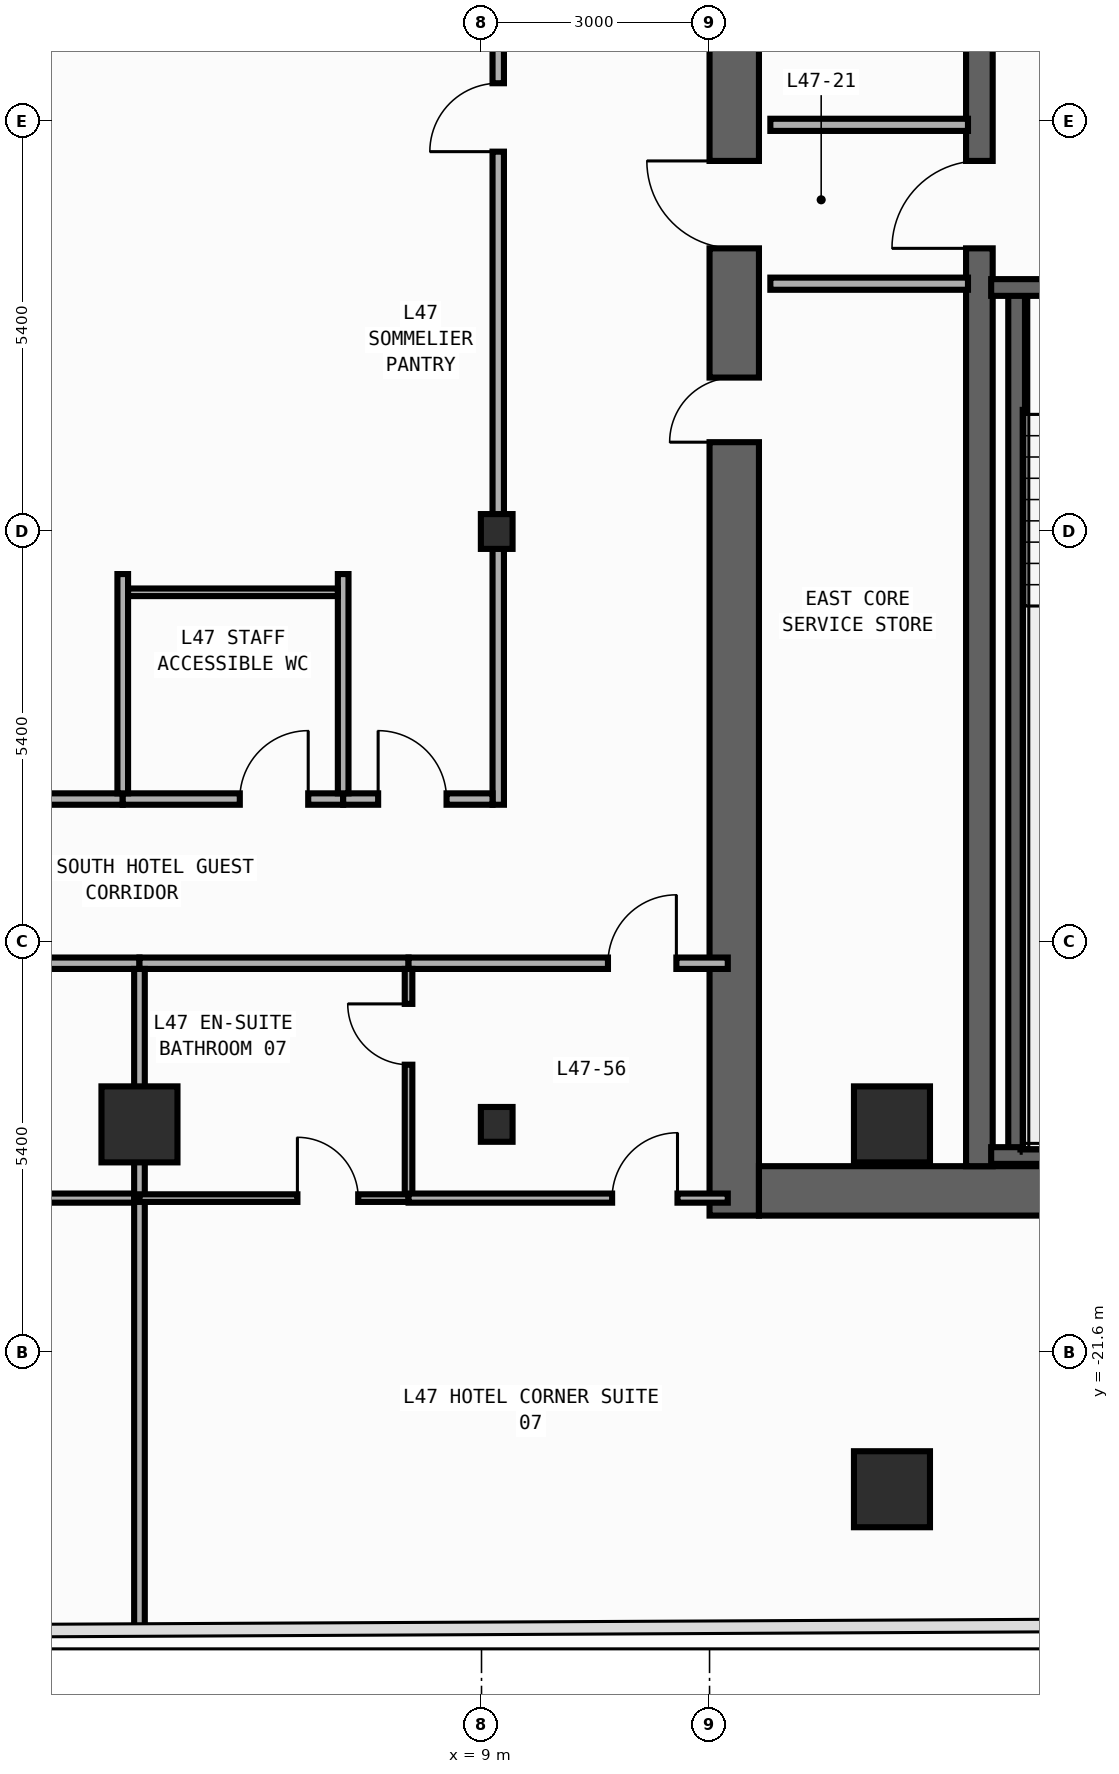
"""IFC4 building model, lengths in metres.
Left out: names, types, materials, properties, quantities, classifications, styles, units other than length and angle.
Written with IfcOpenShell. Run it as: python <this file> out.ifc"""

import sys

from ifc_helpers import new_model, si_unit, direction, frame, frame_2d, origin, origin_2d, place, context, subcontext, project, spatial, rectangle, i_section, extrude, element, fill, save


model = new_model("IFC4")
c1 = context("Model", 3, precision=1e-05, world=origin(), true_north=direction((0.0, 1.0)))
c2 = subcontext(c1, "Body", "Model", "MODEL_VIEW")
j1 = project(units=[si_unit("LENGTHUNIT", "METRE"), si_unit("PLANEANGLEUNIT", "RADIAN")], contexts=[c1])
p1 = place(None, origin())
s1 = spatial("IfcSite", under=j1, at=p1, CompositionType="ELEMENT")
p2 = place(p1, origin())
s2 = spatial("IfcBuilding", under=s1, at=p2, CompositionType="ELEMENT")
p3 = place(p2, frame((0.0, 0.0, 203.0)))
s3 = spatial("IfcBuildingStorey", under=s2, at=p3, CompositionType="ELEMENT", Elevation=203.0)
p4 = place(p3, frame((12.325, -19.8, 0.0), z_axis=(0.0, 0.0, 1.0), x_axis=(0.0, 1.0, 0.0)))
e1 = element("IfcWall", 1, at=p4, inside=s3, PredefinedType="SHEAR", context=c2, shape_type="SweptSolid", body=[
    extrude(rectangle(XDim=27.0, YDim=0.65, at=frame_2d((13.5, 0.0))), origin(), (0.0, 0.0, 1.0), 3.54),
])
p5 = place(p4, frame((23.05, 0.0, 0.0)))
e2 = element("IfcOpeningElement", 2, at=p5, cuts=e1, PredefinedType="OPENING", context=c2, shape_type="SweptSolid", body=[
    extrude(rectangle(XDim=1.1, YDim=2.2, at=frame_2d((0.55, 1.1))), frame((0.0, 0.335, 0.0), z_axis=(0.0, -1.0, 0.0), x_axis=(1.0, 0.0, 0.0)), (0.0, 0.0, 1.0), 0.67),
])
p6 = place(p4, frame((19.85, 0.0, 0.0)))
e3 = element("IfcOpeningElement", 3, at=p6, cuts=e1, PredefinedType="OPENING", context=c2, shape_type="SweptSolid", body=[
    extrude(rectangle(XDim=1.1, YDim=2.2, at=frame_2d((0.55, 1.1))), frame((0.0, 0.335, 0.0), z_axis=(0.0, -1.0, 0.0), x_axis=(1.0, 0.0, 0.0)), (0.0, 0.0, 1.0), 0.67),
])
p7 = place(p4, frame((16.65, 0.0, 0.0)))
e4 = element("IfcOpeningElement", 4, at=p7, cuts=e1, PredefinedType="OPENING", context=c2, shape_type="SweptSolid", body=[
    extrude(rectangle(XDim=1.1, YDim=2.2, at=frame_2d((0.55, 1.1))), frame((0.0, 0.335, 0.0), z_axis=(0.0, -1.0, 0.0), x_axis=(1.0, 0.0, 0.0)), (0.0, 0.0, 1.0), 0.67),
])
p8 = place(p4, frame((10.175, 0.0, 0.0)))
e5 = element("IfcOpeningElement", 5, at=p8, cuts=e1, PredefinedType="OPENING", context=c2, shape_type="SweptSolid", body=[
    extrude(rectangle(XDim=0.85, YDim=2.1, at=frame_2d((0.425, 1.05))), frame((0.0, 0.335, 0.0), z_axis=(0.0, -1.0, 0.0), x_axis=(1.0, 0.0, 0.0)), (0.0, 0.0, 1.0), 0.67),
])
p9 = place(p4, frame((12.725, 0.0, 0.0)))
e6 = element("IfcOpeningElement", 6, at=p9, cuts=e1, PredefinedType="OPENING", context=c2, shape_type="SweptSolid", body=[
    extrude(rectangle(XDim=1.15, YDim=2.2, at=frame_2d((0.575, 1.1))), frame((0.0, 0.335, 0.0), z_axis=(0.0, -1.0, 0.0), x_axis=(1.0, 0.0, 0.0)), (0.0, 0.0, 1.0), 0.67),
])
p10 = place(p4, frame((25.125, 0.0, 0.0)))
e7 = element("IfcOpeningElement", 7, at=p10, cuts=e1, PredefinedType="OPENING", context=c2, shape_type="SweptSolid", body=[
    extrude(rectangle(XDim=0.85, YDim=2.1, at=frame_2d((0.425, 1.05))), frame((0.0, 0.335, 0.0), z_axis=(0.0, -1.0, 0.0), x_axis=(1.0, 0.0, 0.0)), (0.0, 0.0, 1.0), 0.67),
])
p11 = place(p3, frame((12.65, -19.475, 0.0), z_axis=(0.0, 0.0, 1.0), x_axis=(1.0, 0.0, 0.0)))
e8 = element("IfcWall", 8, at=p11, inside=s3, PredefinedType="SHEAR", context=c2, shape_type="SweptSolid", body=[
    extrude(rectangle(XDim=7.1, YDim=0.65, at=frame_2d((3.55, 0.0))), origin(), (0.0, 0.0, 1.0), 3.54),
])
p12 = place(p3, frame((15.55, -19.15, 0.0), z_axis=(0.0, 0.0, 1.0), x_axis=(0.0, 1.0, 0.0)))
e9 = element("IfcWall", 9, at=p12, inside=s3, PredefinedType="SHEAR", context=c2, shape_type="SweptSolid", body=[
    extrude(rectangle(XDim=25.7, YDim=0.35, at=frame_2d((12.85, 0.0))), origin(), (0.0, 0.0, 1.0), 3.54),
])
p13 = place(p12, frame((12.075, 0.0, 0.0)))
e10 = element("IfcOpeningElement", 10, at=p13, cuts=e9, PredefinedType="OPENING", context=c2, shape_type="SweptSolid", body=[
    extrude(rectangle(XDim=1.15, YDim=2.2, at=frame_2d((0.575, 1.1))), frame((0.0, 0.185, 0.0), z_axis=(0.0, -1.0, 0.0), x_axis=(1.0, 0.0, 0.0)), (0.0, 0.0, 1.0), 0.37),
])
p14 = place(p12, frame((24.475, 0.0, 0.0)))
e11 = element("IfcOpeningElement", 11, at=p14, cuts=e9, PredefinedType="OPENING", context=c2, shape_type="SweptSolid", body=[
    extrude(rectangle(XDim=0.85, YDim=2.1, at=frame_2d((0.425, 1.05))), frame((0.0, 0.185, 0.0), z_axis=(0.0, -1.0, 0.0), x_axis=(1.0, 0.0, 0.0)), (0.0, 0.0, 1.0), 0.37),
])
p15 = place(p3, frame((16.04, -19.01, 0.0), z_axis=(0.0, 0.0, 1.0), x_axis=(0.0, 1.0, 0.0)))
e12 = element("IfcWall", 12, at=p15, inside=s3, PredefinedType="SHEAR", context=c2, shape_type="SweptSolid", body=[
    extrude(rectangle(XDim=11.42, YDim=0.22, at=frame_2d((5.71, 0.0))), origin(), (0.0, 0.0, 1.0), 3.54),
])
p16 = place(p3, frame((15.705, -19.01, 0.0), z_axis=(0.0, 0.0, 1.0), x_axis=(1.0, 0.0, 0.0)))
e13 = element("IfcWall", 13, at=p16, inside=s3, PredefinedType="SHEAR", context=c2, shape_type="SweptSolid", body=[
    extrude(rectangle(XDim=4.065, YDim=0.22, at=frame_2d((2.032, 0.0))), origin(), (0.0, 0.0, 1.0), 3.54),
])
p17 = place(p3, frame((19.77, -7.59, 0.0), z_axis=(0.0, 0.0, 1.0), x_axis=(-1.0, 0.0, 0.0)))
e14 = element("IfcWall", 14, at=p17, inside=s3, PredefinedType="SHEAR", context=c2, shape_type="SweptSolid", body=[
    extrude(rectangle(XDim=4.065, YDim=0.22, at=frame_2d((2.032, 0.0))), origin(), (0.0, 0.0, 1.0), 3.54),
])
p18 = place(p17, frame((1.08, 0.0, 0.0)))
e15 = element("IfcOpeningElement", 15, at=p18, cuts=e14, PredefinedType="OPENING", context=c2, shape_type="SweptSolid", body=[
    extrude(rectangle(XDim=1.1, YDim=2.2, at=frame_2d((0.55, 1.1))), frame((0.0, 0.12, 0.0), z_axis=(0.0, -1.0, 0.0), x_axis=(1.0, 0.0, 0.0)), (0.0, 0.0, 1.0), 0.24),
])
for number, where, z_axis, x_axis in (
    (16, (9.2, -18.6, 0.0), (0.0, 0.0, 1.0), (1.0, 0.0, 0.0)),
    (17, (9.2, -10.8, 0.0), (0.0, 0.0, 1.0), (1.0, 0.0, 0.0)),
):
    element("IfcColumn", number, at=place(p3, frame(where, z_axis=z_axis, x_axis=x_axis)), inside=s3, PredefinedType="COLUMN", context=c2, shape_type="SweptSolid", body=[
        extrude(i_section(OverallWidth=0.417, OverallDepth=0.458, WebThickness=0.03, FlangeThickness=0.05, FilletRadius=0.022, at=origin_2d()), origin(), (0.0, 0.0, 1.0), 3.8),
    ])
for number, where, z_axis, x_axis in (
    (18, (14.4, -18.6, 0.0), (0.0, 0.0, 1.0), (1.0, 0.0, 0.0)),
    (19, (4.5, -18.6, 0.0), (0.0, 0.0, 1.0), (1.0, 0.0, 0.0)),
    (20, (14.4, -23.4, 0.0), (0.0, 0.0, 1.0), (1.0, 0.0, 0.0)),
):
    element("IfcColumn", number, at=place(p3, frame(where, z_axis=z_axis, x_axis=x_axis)), inside=s3, PredefinedType="COLUMN", context=c2, shape_type="SweptSolid", body=[
        extrude(rectangle(XDim=1.0, YDim=1.0, at=origin_2d()), origin(), (0.0, 0.0, 1.0), 3.8),
    ])
for number, where, z_axis, x_axis in (
    (21, (12.8, -5.45, 0.0), (0.0, 0.0, 1.0), (1.0, 0.0, 0.0)),
    (22, (12.8, -7.54, 0.0), (0.0, 0.0, 1.0), (1.0, 0.0, 0.0)),
):
    element("IfcWall", number, at=place(p3, frame(where, z_axis=z_axis, x_axis=x_axis)), inside=s3, PredefinedType="STANDARD", context=c2, shape_type="SweptSolid", body=[
        extrude(rectangle(XDim=2.6, YDim=0.16, at=frame_2d((1.3, 0.0))), origin(), (0.0, 0.0, 1.0), 3.54),
    ])
p19 = place(p3, frame((9.22, -14.395, 0.0), z_axis=(0.0, 0.0, 1.0), x_axis=(0.0, 1.0, 0.0)))
e23 = element("IfcWall", 23, at=p19, inside=s3, PredefinedType="PARTITIONING", context=c2, shape_type="SweptSolid", body=[
    extrude(rectangle(XDim=12.595, YDim=0.15, at=frame_2d((6.297, 0.0))), origin(), (0.0, 0.0, 1.0), 2.952),
])
p20 = place(p19, frame((8.592, 0.0, 0.0)))
e24 = element("IfcOpeningElement", 24, at=p20, cuts=e23, PredefinedType="OPENING", context=c2, shape_type="SweptSolid", body=[
    extrude(rectangle(XDim=0.9, YDim=2.15, at=frame_2d((0.45, 1.075))), frame((0.0, 0.085, 0.0), z_axis=(0.0, -1.0, 0.0), x_axis=(1.0, 0.0, 0.0)), (0.0, 0.0, 1.0), 0.17),
])
p21 = place(p3, frame((-3.32, -14.32, 0.0), z_axis=(0.0, 0.0, 1.0), x_axis=(1.0, 0.0, 0.0)))
e25 = element("IfcWall", 25, at=p21, inside=s3, PredefinedType="PARTITIONING", context=c2, shape_type="SweptSolid", body=[
    extrude(rectangle(XDim=7.6, YDim=0.15, at=frame_2d((3.8, 0.0))), origin(), (0.0, 0.0, 1.0), 3.54),
])
p22 = place(p21, frame((0.667, 0.0, 0.0)))
e26 = element("IfcOpeningElement", 26, at=p22, cuts=e25, PredefinedType="OPENING", context=c2, shape_type="SweptSolid", body=[
    extrude(rectangle(XDim=0.9, YDim=2.15, at=frame_2d((0.45, 1.075))), frame((0.0, 0.085, 0.0), z_axis=(0.0, -1.0, 0.0), x_axis=(1.0, 0.0, 0.0)), (0.0, 0.0, 1.0), 0.17),
])
p23 = place(p3, frame((4.28, -14.32, 0.0), z_axis=(0.0, 0.0, 1.0), x_axis=(1.0, 0.0, 0.0)))
e27 = element("IfcWall", 27, at=p23, inside=s3, PredefinedType="PARTITIONING", context=c2, shape_type="SweptSolid", body=[
    extrude(rectangle(XDim=2.9, YDim=0.15, at=frame_2d((1.45, 0.0))), origin(), (0.0, 0.0, 1.0), 3.54),
])
p24 = place(p23, frame((1.54, 0.0, 0.0)))
e28 = element("IfcOpeningElement", 28, at=p24, cuts=e27, PredefinedType="OPENING", context=c2, shape_type="SweptSolid", body=[
    extrude(rectangle(XDim=0.9, YDim=2.15, at=frame_2d((0.45, 1.075))), frame((0.0, 0.085, 0.0), z_axis=(0.0, -1.0, 0.0), x_axis=(1.0, 0.0, 0.0)), (0.0, 0.0, 1.0), 0.17),
])
p25 = place(p3, frame((7.18, -14.32, 0.0), z_axis=(0.0, 0.0, 1.0), x_axis=(1.0, 0.0, 0.0)))
e29 = element("IfcWall", 29, at=p25, inside=s3, PredefinedType="PARTITIONING", context=c2, shape_type="SweptSolid", body=[
    extrude(rectangle(XDim=1.965, YDim=0.15, at=frame_2d((0.982, 0.0))), origin(), (0.0, 0.0, 1.0), 3.54),
])
p26 = place(p25, frame((0.46, 0.0, 0.0)))
e30 = element("IfcOpeningElement", 30, at=p26, cuts=e29, PredefinedType="OPENING", context=c2, shape_type="SweptSolid", body=[
    extrude(rectangle(XDim=0.9, YDim=2.15, at=frame_2d((0.45, 1.075))), frame((0.0, 0.085, 0.0), z_axis=(0.0, -1.0, 0.0), x_axis=(1.0, 0.0, 0.0)), (0.0, 0.0, 1.0), 0.17),
])
p27 = place(p3, frame((-5.46, -16.48, 0.0), z_axis=(0.0, 0.0, 1.0), x_axis=(1.0, 0.0, 0.0)))
e31 = element("IfcWall", 31, at=p27, inside=s3, PredefinedType="PARTITIONING", context=c2, shape_type="SweptSolid", body=[
    extrude(rectangle(XDim=9.96, YDim=0.15, at=frame_2d((4.98, 0.0))), origin(), (0.0, 0.0, 1.0), 3.54),
])
p28 = place(p27, frame((2.698, 0.0, 0.0)))
e32 = element("IfcOpeningElement", 32, at=p28, cuts=e31, PredefinedType="OPENING", context=c2, shape_type="SweptSolid", body=[
    extrude(rectangle(XDim=0.9, YDim=2.15, at=frame_2d((0.45, 1.075))), frame((0.0, 0.085, 0.0), z_axis=(0.0, -1.0, 0.0), x_axis=(1.0, 0.0, 0.0)), (0.0, 0.0, 1.0), 0.17),
])
p29 = place(p3, frame((4.5, -16.48, 0.0), z_axis=(0.0, 0.0, 1.0), x_axis=(1.0, 0.0, 0.0)))
e33 = element("IfcWall", 33, at=p29, inside=s3, PredefinedType="PARTITIONING", context=c2, shape_type="SweptSolid", body=[
    extrude(rectangle(XDim=3.54, YDim=0.15, at=frame_2d((1.77, 0.0))), origin(), (0.0, 0.0, 1.0), 3.54),
])
p30 = place(p3, frame((8.04, -16.48, 0.0), z_axis=(0.0, 0.0, 1.0), x_axis=(1.0, 0.0, 0.0)))
e34 = element("IfcWall", 34, at=p30, inside=s3, PredefinedType="PARTITIONING", context=c2, shape_type="SweptSolid", body=[
    extrude(rectangle(XDim=4.2, YDim=0.15, at=frame_2d((2.1, 0.0))), origin(), (0.0, 0.0, 1.0), 3.54),
])
p31 = place(p30, frame((2.624, 0.0, 0.0)))
e35 = element("IfcOpeningElement", 35, at=p31, cuts=e34, PredefinedType="OPENING", context=c2, shape_type="SweptSolid", body=[
    extrude(rectangle(XDim=0.9, YDim=2.15, at=frame_2d((0.45, 1.075))), frame((0.0, 0.085, 0.0), z_axis=(0.0, -1.0, 0.0), x_axis=(1.0, 0.0, 0.0)), (0.0, 0.0, 1.0), 0.17),
])
for number, where, z_axis, x_axis in (
    (36, (4.28, -14.245, 0.0), (0.0, 0.0, 1.0), (0.0, 1.0, 0.0)),
    (37, (7.18, -14.245, 0.0), (0.0, 0.0, 1.0), (0.0, 1.0, 0.0)),
):
    element("IfcWall", number, at=place(p3, frame(where, z_axis=z_axis, x_axis=x_axis)), inside=s3, PredefinedType="PARTITIONING", context=c2, shape_type="SweptSolid", body=[
        extrude(rectangle(XDim=2.885, YDim=0.14, at=frame_2d((1.442, 0.0))), origin(), (0.0, 0.0, 1.0), 3.54),
    ])
p32 = place(p3, frame((-5.46, -19.57, 0.0), z_axis=(0.0, 0.0, 1.0), x_axis=(1.0, 0.0, 0.0)))
e38 = element("IfcWall", 38, at=p32, inside=s3, PredefinedType="PARTITIONING", context=c2, shape_type="SweptSolid", body=[
    extrude(rectangle(XDim=9.96, YDim=0.12, at=frame_2d((4.98, 0.0))), origin(), (0.0, 0.0, 1.0), 3.54),
])
p33 = place(p32, frame((2.709, 0.0, 0.0)))
e39 = element("IfcOpeningElement", 39, at=p33, cuts=e38, PredefinedType="OPENING", context=c2, shape_type="SweptSolid", body=[
    extrude(rectangle(XDim=0.86, YDim=2.15, at=frame_2d((0.43, 1.075))), frame((0.0, 0.07, 0.0), z_axis=(0.0, -1.0, 0.0), x_axis=(1.0, 0.0, 0.0)), (0.0, 0.0, 1.0), 0.14),
])
p34 = place(p3, frame((4.5, -19.57, 0.0), z_axis=(0.0, 0.0, 1.0), x_axis=(0.0, 1.0, 0.0)))
e40 = element("IfcWall", 40, at=p34, inside=s3, PredefinedType="PARTITIONING", context=c2, shape_type="SweptSolid", body=[
    extrude(rectangle(XDim=3.015, YDim=0.14, at=frame_2d((1.508, 0.0))), origin(), (0.0, 0.0, 1.0), 3.54),
])
p35 = place(p3, frame((4.5, -25.248, 0.0), z_axis=(0.0, 0.0, 1.0), x_axis=(0.0, 1.0, 0.0)))
e41 = element("IfcWall", 41, at=p35, inside=s3, PredefinedType="PARTITIONING", context=c2, shape_type="SweptSolid", body=[
    extrude(rectangle(XDim=5.677, YDim=0.14, at=frame_2d((2.839, 0.0))), origin(), (0.0, 0.0, 1.0), 3.54),
])
p36 = place(p3, frame((8.04, -19.52, 0.0), z_axis=(0.0, 0.0, 1.0), x_axis=(0.0, 1.0, 0.0)))
e42 = element("IfcWall", 42, at=p36, inside=s3, PredefinedType="PARTITIONING", context=c2, shape_type="SweptSolid", body=[
    extrude(rectangle(XDim=2.965, YDim=0.1, at=frame_2d((1.482, 0.0))), origin(), (0.0, 0.0, 1.0), 3.54),
])
p37 = place(p36, frame((1.705, 0.0, 0.0)))
e43 = element("IfcOpeningElement", 43, at=p37, cuts=e42, PredefinedType="OPENING", context=c2, shape_type="SweptSolid", body=[
    extrude(rectangle(XDim=0.8, YDim=2.1, at=frame_2d((0.4, 1.05))), frame((0.0, 0.06, 0.0), z_axis=(0.0, -1.0, 0.0), x_axis=(1.0, 0.0, 0.0)), (0.0, 0.0, 1.0), 0.12),
])
p38 = place(p3, frame((4.5, -19.57, 0.0), z_axis=(0.0, 0.0, 1.0), x_axis=(1.0, 0.0, 0.0)))
e44 = element("IfcWall", 44, at=p38, inside=s3, PredefinedType="PARTITIONING", context=c2, shape_type="SweptSolid", body=[
    extrude(rectangle(XDim=3.54, YDim=0.1, at=frame_2d((1.77, 0.0))), origin(), (0.0, 0.0, 1.0), 3.54),
])
p39 = place(p38, frame((2.078, 0.0, 0.0)))
e45 = element("IfcOpeningElement", 45, at=p39, cuts=e44, PredefinedType="OPENING", context=c2, shape_type="SweptSolid", body=[
    extrude(rectangle(XDim=0.8, YDim=2.1, at=frame_2d((0.4, 1.05))), frame((0.0, 0.06, 0.0), z_axis=(0.0, -1.0, 0.0), x_axis=(1.0, 0.0, 0.0)), (0.0, 0.0, 1.0), 0.12),
])
p40 = place(p3, frame((8.04, -19.57, 0.0), z_axis=(0.0, 0.0, 1.0), x_axis=(1.0, 0.0, 0.0)))
e46 = element("IfcWall", 46, at=p40, inside=s3, PredefinedType="PARTITIONING", context=c2, shape_type="SweptSolid", body=[
    extrude(rectangle(XDim=4.2, YDim=0.12, at=frame_2d((2.1, 0.0))), origin(), (0.0, 0.0, 1.0), 3.54),
])
p41 = place(p40, frame((2.678, 0.0, 0.0)))
e47 = element("IfcOpeningElement", 47, at=p41, cuts=e46, PredefinedType="OPENING", context=c2, shape_type="SweptSolid", body=[
    extrude(rectangle(XDim=0.86, YDim=2.15, at=frame_2d((0.43, 1.075))), frame((0.0, 0.07, 0.0), z_axis=(0.0, -1.0, 0.0), x_axis=(1.0, 0.0, 0.0)), (0.0, 0.0, 1.0), 0.14),
])
p42 = place(p3, frame((4.35, -11.6, 0.0), z_axis=(0.0, 0.0, 1.0), x_axis=(1.0, 0.0, 0.0)))
e48 = element("IfcWall", 48, at=p42, inside=s3, PredefinedType="PARTITIONING", context=c2, shape_type="SweptSolid", body=[
    extrude(rectangle(XDim=2.76, YDim=0.1, at=frame_2d((1.38, 0.0))), origin(), (0.0, 0.0, 1.0), 3.54),
])
p43 = place(p8, origin())
e49 = element("IfcDoor", 49, at=p43, inside=s3, OperationType="SINGLE_SWING_LEFT", PredefinedType="DOOR", context=c2, shape_type="SweptSolid", body=[
    extrude(rectangle(XDim=0.85, YDim=2.1, at=frame_2d((0.425, 1.05))), frame((0.0, 0.025, 0.0), z_axis=(0.0, -1.0, 0.0), x_axis=(1.0, 0.0, 0.0)), (0.0, 0.0, 1.0), 0.05),
])
fill(e5, e49)
p44 = place(p9, origin())
e50 = element("IfcDoor", 50, at=p44, inside=s3, OperationType="SINGLE_SWING_RIGHT", PredefinedType="DOOR", context=c2, shape_type="SweptSolid", body=[
    extrude(rectangle(XDim=1.15, YDim=2.2, at=frame_2d((0.575, 1.1))), frame((0.0, 0.025, 0.0), z_axis=(0.0, -1.0, 0.0), x_axis=(1.0, 0.0, 0.0)), (0.0, 0.0, 1.0), 0.05),
])
fill(e6, e50)
p45 = place(p13, origin())
e51 = element("IfcDoor", 51, at=p45, inside=s3, OperationType="SINGLE_SWING_LEFT", PredefinedType="DOOR", context=c2, shape_type="SweptSolid", body=[
    extrude(rectangle(XDim=1.15, YDim=2.2, at=frame_2d((0.575, 1.1))), frame((0.0, 0.025, 0.0), z_axis=(0.0, -1.0, 0.0), x_axis=(1.0, 0.0, 0.0)), (0.0, 0.0, 1.0), 0.05),
])
fill(e10, e51)
p46 = place(p20, origin())
e52 = element("IfcDoor", 52, at=p46, inside=s3, OperationType="SINGLE_SWING_LEFT", PredefinedType="DOOR", context=c2, shape_type="SweptSolid", body=[
    extrude(rectangle(XDim=0.9, YDim=2.15, at=frame_2d((0.45, 1.075))), frame((0.0, 0.025, 0.0), z_axis=(0.0, -1.0, 0.0), x_axis=(1.0, 0.0, 0.0)), (0.0, 0.0, 1.0), 0.05),
])
fill(e24, e52)
p47 = place(p24, origin())
e53 = element("IfcDoor", 53, at=p47, inside=s3, OperationType="SINGLE_SWING_RIGHT", PredefinedType="DOOR", context=c2, shape_type="SweptSolid", body=[
    extrude(rectangle(XDim=0.9, YDim=2.15, at=frame_2d((0.45, 1.075))), frame((0.0, 0.025, 0.0), z_axis=(0.0, -1.0, 0.0), x_axis=(1.0, 0.0, 0.0)), (0.0, 0.0, 1.0), 0.05),
])
fill(e28, e53)
p48 = place(p26, origin())
e54 = element("IfcDoor", 54, at=p48, inside=s3, OperationType="SINGLE_SWING_LEFT", PredefinedType="DOOR", context=c2, shape_type="SweptSolid", body=[
    extrude(rectangle(XDim=0.9, YDim=2.15, at=frame_2d((0.45, 1.075))), frame((0.0, 0.025, 0.0), z_axis=(0.0, -1.0, 0.0), x_axis=(1.0, 0.0, 0.0)), (0.0, 0.0, 1.0), 0.05),
])
fill(e30, e54)
p49 = place(p31, origin())
e55 = element("IfcDoor", 55, at=p49, inside=s3, OperationType="SINGLE_SWING_RIGHT", PredefinedType="DOOR", context=c2, shape_type="SweptSolid", body=[
    extrude(rectangle(XDim=0.9, YDim=2.15, at=frame_2d((0.45, 1.075))), frame((0.0, 0.025, 0.0), z_axis=(0.0, -1.0, 0.0), x_axis=(1.0, 0.0, 0.0)), (0.0, 0.0, 1.0), 0.05),
])
fill(e35, e55)
p50 = place(p37, origin())
e56 = element("IfcDoor", 56, at=p50, inside=s3, OperationType="SINGLE_SWING_RIGHT", PredefinedType="DOOR", context=c2, shape_type="SweptSolid", body=[
    extrude(rectangle(XDim=0.8, YDim=2.1, at=frame_2d((0.4, 1.05))), frame((0.0, 0.025, 0.0), z_axis=(0.0, -1.0, 0.0), x_axis=(1.0, 0.0, 0.0)), (0.0, 0.0, 1.0), 0.05),
])
fill(e43, e56)
p51 = place(p39, origin())
e57 = element("IfcDoor", 57, at=p51, inside=s3, OperationType="SINGLE_SWING_LEFT", PredefinedType="DOOR", context=c2, shape_type="SweptSolid", body=[
    extrude(rectangle(XDim=0.8, YDim=2.1, at=frame_2d((0.4, 1.05))), frame((0.0, 0.025, 0.0), z_axis=(0.0, -1.0, 0.0), x_axis=(1.0, 0.0, 0.0)), (0.0, 0.0, 1.0), 0.05),
])
fill(e45, e57)
p52 = place(p41, origin())
e58 = element("IfcDoor", 58, at=p52, inside=s3, OperationType="SINGLE_SWING_RIGHT", PredefinedType="DOOR", context=c2, shape_type="SweptSolid", body=[
    extrude(rectangle(XDim=0.86, YDim=2.15, at=frame_2d((0.43, 1.075))), frame((0.0, 0.025, 0.0), z_axis=(0.0, -1.0, 0.0), x_axis=(1.0, 0.0, 0.0)), (0.0, 0.0, 1.0), 0.05),
])
fill(e47, e58)
save(model, sys.argv[1])
